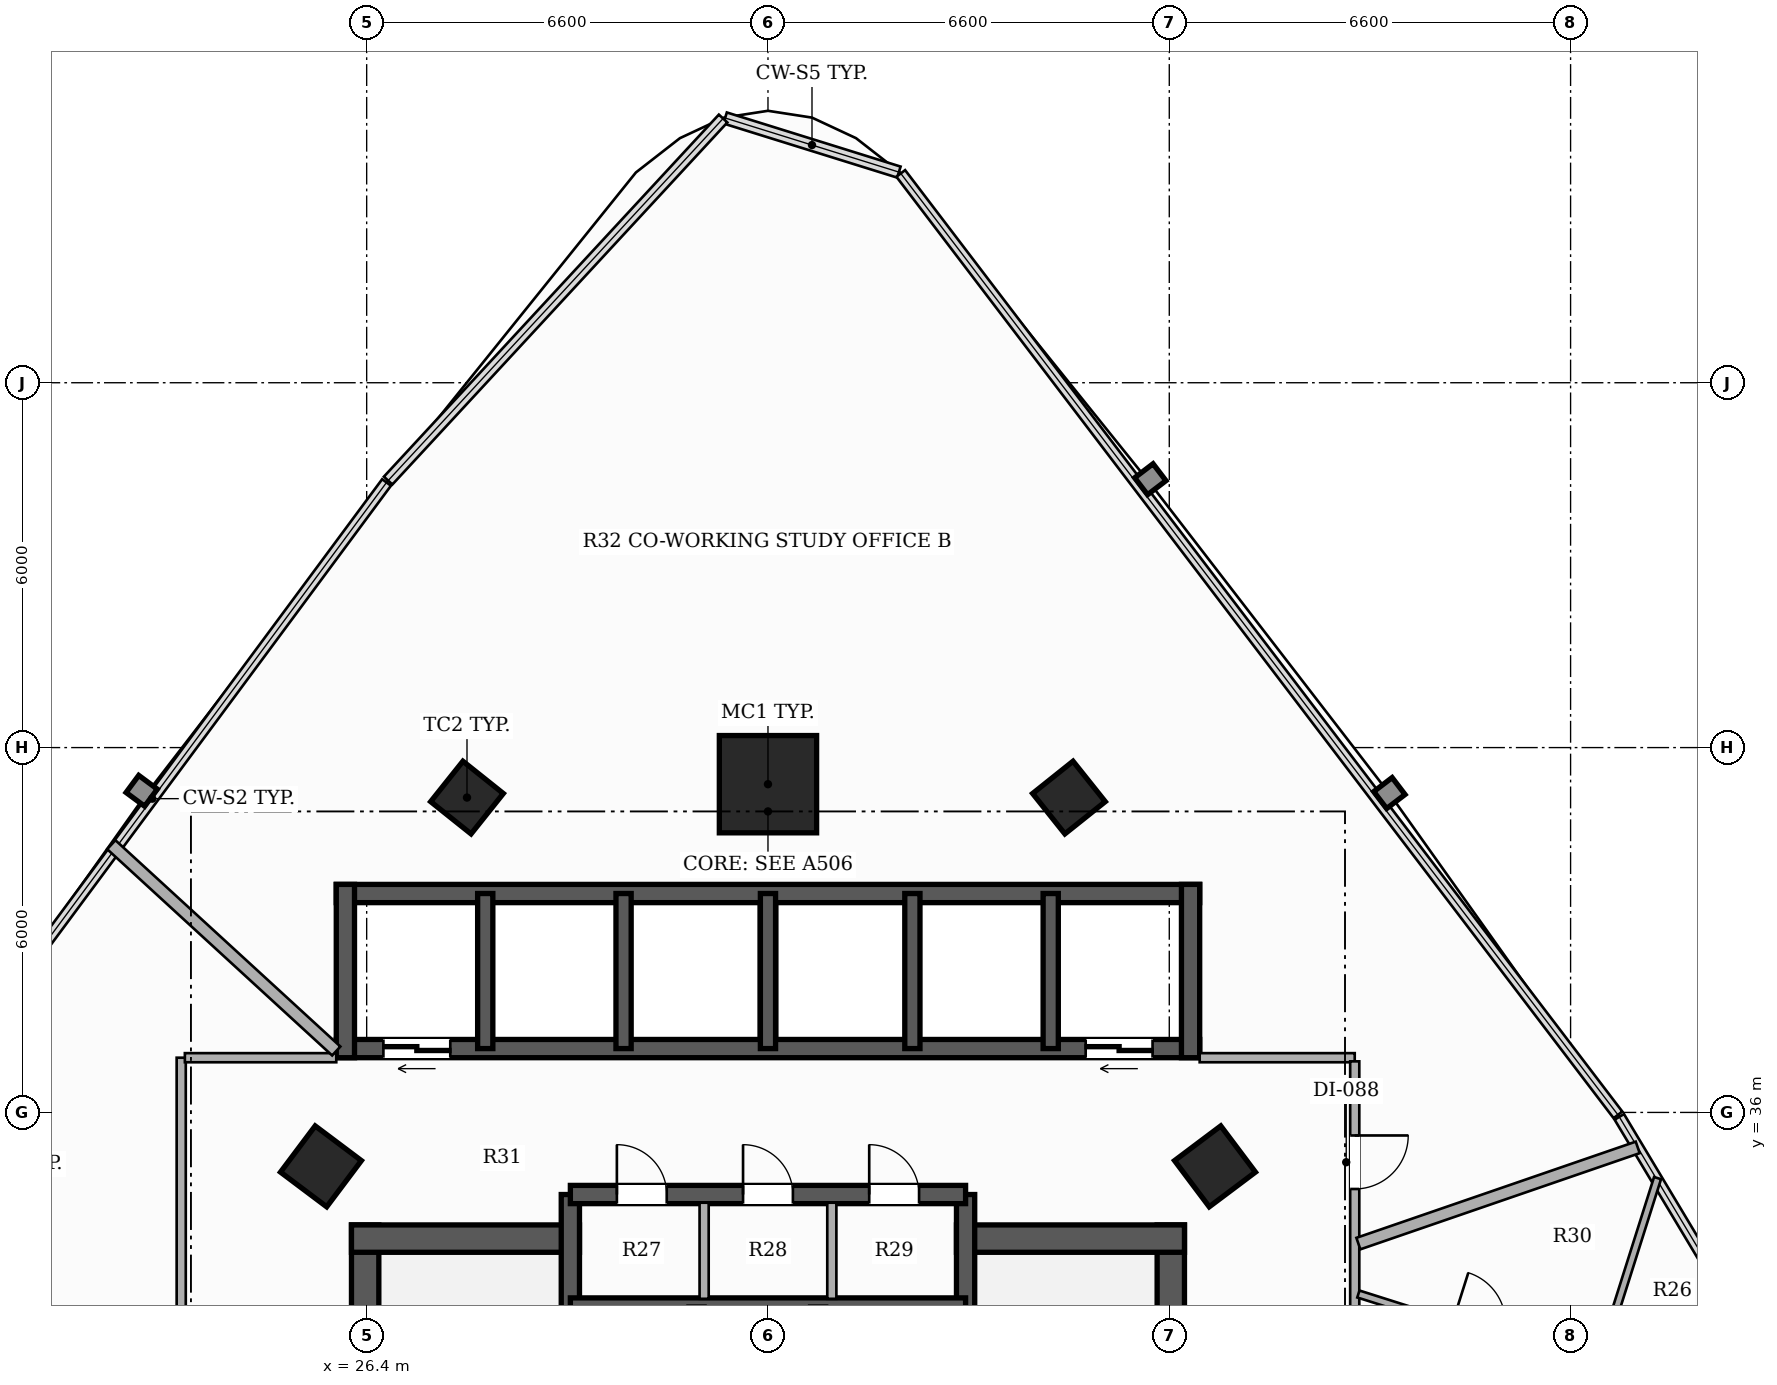
"""IFC4 building model, lengths in metres.
Left out: names, types, materials, properties, quantities, classifications, styles, units other than length and angle.
Written with IfcOpenShell. Run it as: python <this file> out.ifc"""

import sys

from ifc_helpers import new_model, si_unit, direction, frame, frame_2d, origin, origin_2d, place, context, subcontext, project, spatial, rectangle, hollow_rectangle, extrude, element, fill, save


model = new_model("IFC4")
c1 = context("Model", 3, precision=1e-05, world=origin(), true_north=direction((0.0, 1.0)))
c2 = subcontext(c1, "Body", "Model", "MODEL_VIEW")
j1 = project(units=[si_unit("LENGTHUNIT", "METRE"), si_unit("PLANEANGLEUNIT", "RADIAN")], contexts=[c1])
p1 = place(None, origin())
s1 = spatial("IfcSite", under=j1, at=p1, CompositionType="ELEMENT")
p2 = place(p1, origin())
s2 = spatial("IfcBuilding", under=s1, at=p2, CompositionType="ELEMENT")
p3 = place(p2, frame((0.0, 0.0, 40.1)))
s3 = spatial("IfcBuildingStorey", under=s2, at=p3, CompositionType="ELEMENT", Elevation=40.1)
p4 = place(p3, frame((26.375, 26.45, 0.0), z_axis=(0.0, 0.0, 1.0), x_axis=(0.0, 1.0, 0.0)))
e1 = element("IfcWall", 1, at=p4, inside=s3, PredefinedType="SHEAR", context=c2, shape_type="SweptSolid", body=[
    extrude(rectangle(XDim=7.7, YDim=0.45, at=frame_2d((3.85, 0.0))), origin(), (0.0, 0.0, 1.0), 3.3),
])
p5 = place(p3, frame((26.15, 33.925, 0.0), z_axis=(0.0, 0.0, 1.0), x_axis=(1.0, 0.0, 0.0)))
e2 = element("IfcWall", 2, at=p5, inside=s3, PredefinedType="SHEAR", context=c2, shape_type="SweptSolid", body=[
    extrude(rectangle(XDim=3.75, YDim=0.45, at=frame_2d((1.875, 0.0))), origin(), (0.0, 0.0, 1.0), 3.3),
])
p6 = place(p3, frame((39.625, 26.45, 0.0), z_axis=(0.0, 0.0, 1.0), x_axis=(0.0, 1.0, 0.0)))
e3 = element("IfcWall", 3, at=p6, inside=s3, PredefinedType="SHEAR", context=c2, shape_type="SweptSolid", body=[
    extrude(rectangle(XDim=7.7, YDim=0.45, at=frame_2d((3.85, 0.0))), origin(), (0.0, 0.0, 1.0), 3.3),
])
p7 = place(p3, frame((36.1, 33.925, 0.0), z_axis=(0.0, 0.0, 1.0), x_axis=(1.0, 0.0, 0.0)))
e4 = element("IfcWall", 4, at=p7, inside=s3, PredefinedType="SHEAR", context=c2, shape_type="SweptSolid", body=[
    extrude(rectangle(XDim=3.75, YDim=0.45, at=frame_2d((1.875, 0.0))), origin(), (0.0, 0.0, 1.0), 3.3),
])
p8 = place(p3, frame((29.75, 26.45, 0.0), z_axis=(0.0, 0.0, 1.0), x_axis=(0.0, 1.0, 0.0)))
e5 = element("IfcWall", 5, at=p8, inside=s3, PredefinedType="SHEAR", context=c2, shape_type="SweptSolid", body=[
    extrude(rectangle(XDim=8.2, YDim=0.3, at=frame_2d((4.1, 0.0))), origin(), (0.0, 0.0, 1.0), 3.3),
])
p9 = place(p8, frame((0.6, 0.0, 0.0)))
e6 = element("IfcOpeningElement", 6, at=p9, cuts=e5, PredefinedType="OPENING", context=c2, shape_type="SweptSolid", body=[
    extrude(rectangle(XDim=1.05, YDim=2.15, at=frame_2d((0.525, 1.075))), frame((0.0, 0.16, 0.0), z_axis=(0.0, -1.0, 0.0), x_axis=(1.0, 0.0, 0.0)), (0.0, 0.0, 1.0), 0.32),
])
p10 = place(p3, frame((36.25, 26.45, 0.0), z_axis=(0.0, 0.0, 1.0), x_axis=(0.0, 1.0, 0.0)))
e7 = element("IfcWall", 7, at=p10, inside=s3, PredefinedType="SHEAR", context=c2, shape_type="SweptSolid", body=[
    extrude(rectangle(XDim=8.2, YDim=0.3, at=frame_2d((4.1, 0.0))), origin(), (0.0, 0.0, 1.0), 3.3),
])
p11 = place(p10, frame((0.6, 0.0, 0.0)))
e8 = element("IfcOpeningElement", 8, at=p11, cuts=e7, PredefinedType="OPENING", context=c2, shape_type="SweptSolid", body=[
    extrude(rectangle(XDim=1.05, YDim=2.15, at=frame_2d((0.525, 1.075))), frame((0.0, 0.16, 0.0), z_axis=(0.0, -1.0, 0.0), x_axis=(1.0, 0.0, 0.0)), (0.0, 0.0, 1.0), 0.32),
])
p12 = place(p3, frame((29.75, 32.8, 0.0), z_axis=(0.0, 0.0, 1.0), x_axis=(1.0, 0.0, 0.0)))
e9 = element("IfcWall", 9, at=p12, inside=s3, PredefinedType="SHEAR", context=c2, shape_type="SweptSolid", body=[
    extrude(rectangle(XDim=6.5, YDim=0.3, at=frame_2d((3.25, 0.0))), origin(), (0.0, 0.0, 1.0), 3.3),
])
p13 = place(p3, frame((29.75, 34.65, 0.0), z_axis=(0.0, 0.0, 1.0), x_axis=(1.0, 0.0, 0.0)))
e10 = element("IfcWall", 10, at=p13, inside=s3, PredefinedType="SHEAR", context=c2, shape_type="SweptSolid", body=[
    extrude(rectangle(XDim=6.5, YDim=0.3, at=frame_2d((3.25, 0.0))), origin(), (0.0, 0.0, 1.0), 3.3),
])
p14 = place(p13, frame((0.765, 0.0, 0.0)))
e11 = element("IfcOpeningElement", 11, at=p14, cuts=e10, PredefinedType="OPENING", context=c2, shape_type="SweptSolid", body=[
    extrude(rectangle(XDim=0.82, YDim=2.1, at=frame_2d((0.41, 1.05))), frame((0.0, 0.16, 0.0), z_axis=(0.0, -1.0, 0.0), x_axis=(1.0, 0.0, 0.0)), (0.0, 0.0, 1.0), 0.32),
])
p15 = place(p13, frame((2.84, 0.0, 0.0)))
e12 = element("IfcOpeningElement", 12, at=p15, cuts=e10, PredefinedType="OPENING", context=c2, shape_type="SweptSolid", body=[
    extrude(rectangle(XDim=0.82, YDim=2.1, at=frame_2d((0.41, 1.05))), frame((0.0, 0.16, 0.0), z_axis=(0.0, -1.0, 0.0), x_axis=(1.0, 0.0, 0.0)), (0.0, 0.0, 1.0), 0.32),
])
p16 = place(p13, frame((4.915, 0.0, 0.0)))
e13 = element("IfcOpeningElement", 13, at=p16, cuts=e10, PredefinedType="OPENING", context=c2, shape_type="SweptSolid", body=[
    extrude(rectangle(XDim=0.82, YDim=2.1, at=frame_2d((0.41, 1.05))), frame((0.0, 0.16, 0.0), z_axis=(0.0, -1.0, 0.0), x_axis=(1.0, 0.0, 0.0)), (0.0, 0.0, 1.0), 0.32),
])
p17 = place(p3, frame((40.1, 37.05, 0.0), z_axis=(0.0, 0.0, 1.0), x_axis=(-1.0, 0.0, 0.0)))
e14 = element("IfcWall", 14, at=p17, inside=s3, PredefinedType="SHEAR", context=c2, shape_type="SweptSolid", body=[
    extrude(rectangle(XDim=14.2, YDim=0.3, at=frame_2d((7.1, 0.0))), origin(), (0.0, 0.0, 1.0), 3.3),
])
p18 = place(p17, frame((12.325, 0.0, 0.0)))
e15 = element("IfcOpeningElement", 15, at=p18, cuts=e14, PredefinedType="OPENING", context=c2, shape_type="SweptSolid", body=[
    extrude(rectangle(XDim=1.1, YDim=2.2, at=frame_2d((0.55, 1.1))), frame((0.0, 0.16, 0.0), z_axis=(0.0, -1.0, 0.0), x_axis=(1.0, 0.0, 0.0)), (0.0, 0.0, 1.0), 0.32),
])
p19 = place(p17, frame((0.775, 0.0, 0.0)))
e16 = element("IfcOpeningElement", 16, at=p19, cuts=e14, PredefinedType="OPENING", context=c2, shape_type="SweptSolid", body=[
    extrude(rectangle(XDim=1.1, YDim=2.2, at=frame_2d((0.55, 1.1))), frame((0.0, 0.16, 0.0), z_axis=(0.0, -1.0, 0.0), x_axis=(1.0, 0.0, 0.0)), (0.0, 0.0, 1.0), 0.32),
])
p20 = place(p3, frame((25.9, 39.6, 0.0), z_axis=(0.0, 0.0, 1.0), x_axis=(1.0, 0.0, 0.0)))
e17 = element("IfcWall", 17, at=p20, inside=s3, PredefinedType="SHEAR", context=c2, shape_type="SweptSolid", body=[
    extrude(rectangle(XDim=14.2, YDim=0.3, at=frame_2d((7.1, 0.0))), origin(), (0.0, 0.0, 1.0), 3.3),
])
for number, where, z_axis, x_axis in (
    (18, (26.05, 36.9, 0.0), (0.0, 0.0, 1.0), (0.0, 1.0, 0.0)),
    (19, (39.95, 36.9, 0.0), (0.0, 0.0, 1.0), (0.0, 1.0, 0.0)),
):
    element("IfcWall", number, at=place(p3, frame(where, z_axis=z_axis, x_axis=x_axis)), inside=s3, PredefinedType="SHEAR", context=c2, shape_type="SweptSolid", body=[
        extrude(rectangle(XDim=2.85, YDim=0.3, at=frame_2d((1.425, 0.0))), origin(), (0.0, 0.0, 1.0), 3.3),
    ])
for number, where, z_axis, x_axis in (
    (20, (28.35, 37.05, 0.0), (0.0, 0.0, 1.0), (0.0, 1.0, 0.0)),
    (21, (30.625, 37.05, 0.0), (0.0, 0.0, 1.0), (0.0, 1.0, 0.0)),
    (22, (33.0, 37.05, 0.0), (0.0, 0.0, 1.0), (0.0, 1.0, 0.0)),
    (23, (35.375, 37.05, 0.0), (0.0, 0.0, 1.0), (0.0, 1.0, 0.0)),
    (24, (37.65, 37.05, 0.0), (0.0, 0.0, 1.0), (0.0, 1.0, 0.0)),
):
    element("IfcWall", number, at=place(p3, frame(where, z_axis=z_axis, x_axis=x_axis)), inside=s3, PredefinedType="SHEAR", context=c2, shape_type="SweptSolid", body=[
        extrude(rectangle(XDim=2.55, YDim=0.25, at=frame_2d((1.275, 0.0))), origin(), (0.0, 0.0, 1.0), 3.3),
    ])
p21 = place(p3, frame((33.0, 41.398, 0.0), z_axis=(0.0, 0.0, 1.0), x_axis=(1.0, 0.0, 0.0)))
e25 = element("IfcColumn", 25, at=p21, inside=s3, PredefinedType="COLUMN", context=c2, shape_type="SweptSolid", body=[
    extrude(hollow_rectangle(XDim=1.6, YDim=1.6, WallThickness=0.05, at=origin_2d()), origin(), (0.0, 0.0, 1.0), 3.3),
])
for number, where, z_axis, x_axis in (
    (26, (25.648, 35.113, 0.0), (0.0, 0.0, 1.0), (0.6, 0.8, 0.0)),
    (27, (40.352, 35.113, 0.0), (0.0, 0.0, 1.0), (-0.6, 0.8, 0.0)),
):
    element("IfcColumn", number, at=place(p3, frame(where, z_axis=z_axis, x_axis=x_axis)), inside=s3, PredefinedType="COLUMN", context=c2, shape_type="SweptSolid", body=[
        extrude(hollow_rectangle(XDim=0.95, YDim=0.95, WallThickness=0.032, at=origin_2d()), origin(), (0.0, 0.0, 1.0), 3.3),
    ])
for number, where, z_axis, x_axis in (
    (28, (28.05, 41.178, 0.0), (0.0, 0.0, 1.0), (0.624, 0.782, 0.0)),
    (29, (37.95, 41.178, 0.0), (0.0, 0.0, 1.0), (-0.624, 0.782, 0.0)),
):
    element("IfcColumn", number, at=place(p3, frame(where, z_axis=z_axis, x_axis=x_axis)), inside=s3, PredefinedType="COLUMN", context=c2, shape_type="SweptSolid", body=[
        extrude(hollow_rectangle(XDim=0.85, YDim=0.85, WallThickness=0.028, at=origin_2d()), origin(), (0.0, 0.0, 1.0), 3.3),
    ])
for number, where, z_axis, x_axis in (
    (30, (31.95, 32.935, 0.0), (0.0, 0.0, 1.0), (0.0, 1.0, 0.0)),
    (31, (34.05, 32.935, 0.0), (0.0, 0.0, 1.0), (0.0, 1.0, 0.0)),
):
    element("IfcWall", number, at=place(p3, frame(where, z_axis=z_axis, x_axis=x_axis)), inside=s3, PredefinedType="PARTITIONING", context=c2, shape_type="SweptSolid", body=[
        extrude(rectangle(XDim=1.58, YDim=0.15, at=frame_2d((0.79, 0.0))), origin(), (0.0, 0.0, 1.0), 3.06),
    ])
p22 = place(p3, frame((40.1, 36.9, 0.0), z_axis=(0.0, 0.0, 1.0), x_axis=(1.0, 0.0, 0.0)))
e32 = element("IfcWall", 32, at=p22, inside=s3, PredefinedType="PARTITIONING", context=c2, shape_type="SweptSolid", body=[
    extrude(rectangle(XDim=2.55, YDim=0.15, at=frame_2d((1.275, 0.0))), origin(), (0.0, 0.0, 1.0), 2.413),
])
p23 = place(p3, frame((42.65, 36.84, 0.0), z_axis=(0.0, 0.0, 1.0), x_axis=(0.0, -1.0, 0.0)))
e33 = element("IfcWall", 33, at=p23, inside=s3, PredefinedType="PARTITIONING", context=c2, shape_type="SweptSolid", body=[
    extrude(rectangle(XDim=25.04, YDim=0.15, at=frame_2d((12.52, 0.0))), origin(), (0.0, 0.0, 1.0), 2.413),
])
p24 = place(p23, frame((1.219, 0.0, 0.0)))
e34 = element("IfcOpeningElement", 34, at=p24, cuts=e33, PredefinedType="OPENING", context=c2, shape_type="SweptSolid", body=[
    extrude(rectangle(XDim=0.88, YDim=2.1, at=frame_2d((0.44, 1.05))), frame((0.0, 0.085, 0.0), z_axis=(0.0, -1.0, 0.0), x_axis=(1.0, 0.0, 0.0)), (0.0, 0.0, 1.0), 0.17),
])
p25 = place(p23, frame((21.047, 0.0, 0.0)))
e35 = element("IfcOpeningElement", 35, at=p25, cuts=e33, PredefinedType="OPENING", context=c2, shape_type="SweptSolid", body=[
    extrude(rectangle(XDim=0.88, YDim=2.1, at=frame_2d((0.44, 1.05))), frame((0.0, 0.085, 0.0), z_axis=(0.0, -1.0, 0.0), x_axis=(1.0, 0.0, 0.0)), (0.0, 0.0, 1.0), 0.17),
])
p26 = place(p23, frame((16.029, 0.0, 0.0)))
e36 = element("IfcOpeningElement", 36, at=p26, cuts=e33, PredefinedType="OPENING", context=c2, shape_type="SweptSolid", body=[
    extrude(rectangle(XDim=0.92, YDim=2.15, at=frame_2d((0.46, 1.075))), frame((0.0, 0.085, 0.0), z_axis=(0.0, -1.0, 0.0), x_axis=(1.0, 0.0, 0.0)), (0.0, 0.0, 1.0), 0.17),
])
p27 = place(p23, frame((12.486, 0.0, 0.0)))
e37 = element("IfcOpeningElement", 37, at=p27, cuts=e33, PredefinedType="OPENING", context=c2, shape_type="SweptSolid", body=[
    extrude(rectangle(XDim=0.88, YDim=2.1, at=frame_2d((0.44, 1.05))), frame((0.0, 0.085, 0.0), z_axis=(0.0, -1.0, 0.0), x_axis=(1.0, 0.0, 0.0)), (0.0, 0.0, 1.0), 0.17),
])
p28 = place(p23, frame((6.638, 0.0, 0.0)))
e38 = element("IfcOpeningElement", 38, at=p28, cuts=e33, PredefinedType="OPENING", context=c2, shape_type="SweptSolid", body=[
    extrude(rectangle(XDim=0.92, YDim=2.15, at=frame_2d((0.46, 1.075))), frame((0.0, 0.085, 0.0), z_axis=(0.0, -1.0, 0.0), x_axis=(1.0, 0.0, 0.0)), (0.0, 0.0, 1.0), 0.17),
])
p29 = place(p3, frame((23.35, 11.86, 0.0), z_axis=(0.0, 0.0, 1.0), x_axis=(0.0, 1.0, 0.0)))
e39 = element("IfcWall", 39, at=p29, inside=s3, PredefinedType="PARTITIONING", context=c2, shape_type="SweptSolid", body=[
    extrude(rectangle(XDim=25.04, YDim=0.15, at=frame_2d((12.52, 0.0))), origin(), (0.0, 0.0, 1.0), 2.413),
])
p30 = place(p29, frame((9.29, 0.0, 0.0)))
e40 = element("IfcOpeningElement", 40, at=p30, cuts=e39, PredefinedType="OPENING", context=c2, shape_type="SweptSolid", body=[
    extrude(rectangle(XDim=0.92, YDim=2.15, at=frame_2d((0.46, 1.075))), frame((0.0, 0.085, 0.0), z_axis=(0.0, -1.0, 0.0), x_axis=(1.0, 0.0, 0.0)), (0.0, 0.0, 1.0), 0.17),
])
p31 = place(p29, frame((18.865, 0.0, 0.0)))
e41 = element("IfcOpeningElement", 41, at=p31, cuts=e39, PredefinedType="OPENING", context=c2, shape_type="SweptSolid", body=[
    extrude(rectangle(XDim=0.88, YDim=2.1, at=frame_2d((0.44, 1.05))), frame((0.0, 0.085, 0.0), z_axis=(0.0, -1.0, 0.0), x_axis=(1.0, 0.0, 0.0)), (0.0, 0.0, 1.0), 0.17),
])
p32 = place(p29, frame((2.566, 0.0, 0.0)))
e42 = element("IfcOpeningElement", 42, at=p32, cuts=e39, PredefinedType="OPENING", context=c2, shape_type="SweptSolid", body=[
    extrude(rectangle(XDim=0.92, YDim=2.15, at=frame_2d((0.46, 1.075))), frame((0.0, 0.085, 0.0), z_axis=(0.0, -1.0, 0.0), x_axis=(1.0, 0.0, 0.0)), (0.0, 0.0, 1.0), 0.17),
])
p33 = place(p3, frame((23.41, 36.9, 0.0), z_axis=(0.0, 0.0, 1.0), x_axis=(1.0, 0.0, 0.0)))
e43 = element("IfcWall", 43, at=p33, inside=s3, PredefinedType="PARTITIONING", context=c2, shape_type="SweptSolid", body=[
    extrude(rectangle(XDim=2.49, YDim=0.15, at=frame_2d((1.245, 0.0))), origin(), (0.0, 0.0, 1.0), 2.413),
])
p34 = place(p3, frame((25.9, 37.01, 0.0), z_axis=(0.0, 0.0, 1.0), x_axis=(-0.737010798249, 0.675880968266, 0.0)))
e44 = element("IfcWall", 44, at=p34, inside=s3, PredefinedType="PARTITIONING", context=c2, shape_type="SweptSolid", body=[
    extrude(rectangle(XDim=5.02, YDim=0.2, at=frame_2d((2.51, 0.0))), origin(), (0.0, 0.0, 1.0), 3.06),
])
p35 = place(p3, frame((47.304, 35.425, 0.0), z_axis=(0.0, 0.0, 1.0), x_axis=(-0.945506397197, -0.325603520956, 0.0)))
e45 = element("IfcWall", 45, at=p35, inside=s3, PredefinedType="PARTITIONING", context=c2, shape_type="SweptSolid", body=[
    extrude(rectangle(XDim=4.859, YDim=0.2, at=frame_2d((2.429, 0.0))), origin(), (0.0, 0.0, 1.0), 3.06),
])
p36 = place(p3, frame((42.71, 33.014, 0.0), z_axis=(0.0, 0.0, 1.0), x_axis=(0.953299814988, -0.302025599484, 0.0)))
e46 = element("IfcWall", 46, at=p36, inside=s3, PredefinedType="PARTITIONING", context=c2, shape_type="SweptSolid", body=[
    extrude(rectangle(XDim=4.115, YDim=0.12, at=frame_2d((2.058, 0.0))), origin(), (0.0, 0.0, 1.0), 3.06),
])
p37 = place(p36, frame((1.618, 0.0, 0.0)))
e47 = element("IfcOpeningElement", 47, at=p37, cuts=e46, PredefinedType="OPENING", context=c2, shape_type="SweptSolid", body=[
    extrude(rectangle(XDim=0.88, YDim=2.1, at=frame_2d((0.44, 1.05))), frame((0.0, 0.07, 0.0), z_axis=(0.0, -1.0, 0.0), x_axis=(1.0, 0.0, 0.0)), (0.0, 0.0, 1.0), 0.14),
])
p38 = place(p3, frame((46.633, 31.771, 0.0), z_axis=(0.0, 0.0, 1.0), x_axis=(0.301799891186, 0.953371294764, 0.0)))
e48 = element("IfcWall", 48, at=p38, inside=s3, PredefinedType="PARTITIONING", context=c2, shape_type="SweptSolid", body=[
    extrude(rectangle(XDim=3.303, YDim=0.12, at=frame_2d((1.651, 0.0))), origin(), (0.0, 0.0, 1.0), 3.06),
])
p39 = place(p18, origin())
e49 = element("IfcDoor", 49, at=p39, inside=s3, OperationType="DOUBLE_DOOR_SLIDING", PredefinedType="DOOR", context=c2, shape_type="SweptSolid", body=[
    extrude(rectangle(XDim=1.1, YDim=2.2, at=frame_2d((0.55, 1.1))), frame((0.0, 0.025, 0.0), z_axis=(0.0, -1.0, 0.0), x_axis=(1.0, 0.0, 0.0)), (0.0, 0.0, 1.0), 0.05),
])
fill(e15, e49)
p40 = place(p19, origin())
e50 = element("IfcDoor", 50, at=p40, inside=s3, OperationType="DOUBLE_DOOR_SLIDING", PredefinedType="DOOR", context=c2, shape_type="SweptSolid", body=[
    extrude(rectangle(XDim=1.1, YDim=2.2, at=frame_2d((0.55, 1.1))), frame((0.0, 0.025, 0.0), z_axis=(0.0, -1.0, 0.0), x_axis=(1.0, 0.0, 0.0)), (0.0, 0.0, 1.0), 0.05),
])
fill(e16, e50)
p41 = place(p14, origin())
e51 = element("IfcDoor", 51, at=p41, inside=s3, OperationType="SINGLE_SWING_LEFT", PredefinedType="DOOR", context=c2, shape_type="SweptSolid", body=[
    extrude(rectangle(XDim=0.82, YDim=2.1, at=frame_2d((0.41, 1.05))), frame((0.0, 0.025, 0.0), z_axis=(0.0, -1.0, 0.0), x_axis=(1.0, 0.0, 0.0)), (0.0, 0.0, 1.0), 0.05),
])
fill(e11, e51)
p42 = place(p15, origin())
e52 = element("IfcDoor", 52, at=p42, inside=s3, OperationType="SINGLE_SWING_LEFT", PredefinedType="DOOR", context=c2, shape_type="SweptSolid", body=[
    extrude(rectangle(XDim=0.82, YDim=2.1, at=frame_2d((0.41, 1.05))), frame((0.0, 0.025, 0.0), z_axis=(0.0, -1.0, 0.0), x_axis=(1.0, 0.0, 0.0)), (0.0, 0.0, 1.0), 0.05),
])
fill(e12, e52)
p43 = place(p16, origin())
e53 = element("IfcDoor", 53, at=p43, inside=s3, OperationType="SINGLE_SWING_LEFT", PredefinedType="DOOR", context=c2, shape_type="SweptSolid", body=[
    extrude(rectangle(XDim=0.82, YDim=2.1, at=frame_2d((0.41, 1.05))), frame((0.0, 0.025, 0.0), z_axis=(0.0, -1.0, 0.0), x_axis=(1.0, 0.0, 0.0)), (0.0, 0.0, 1.0), 0.05),
])
fill(e13, e53)
p44 = place(p24, origin())
e54 = element("IfcDoor", 54, at=p44, inside=s3, OperationType="SINGLE_SWING_LEFT", PredefinedType="DOOR", context=c2, shape_type="SweptSolid", body=[
    extrude(rectangle(XDim=0.88, YDim=2.1, at=frame_2d((0.44, 1.05))), frame((0.0, 0.025, 0.0), z_axis=(0.0, -1.0, 0.0), x_axis=(1.0, 0.0, 0.0)), (0.0, 0.0, 1.0), 0.05),
])
fill(e34, e54)
save(model, sys.argv[1])
